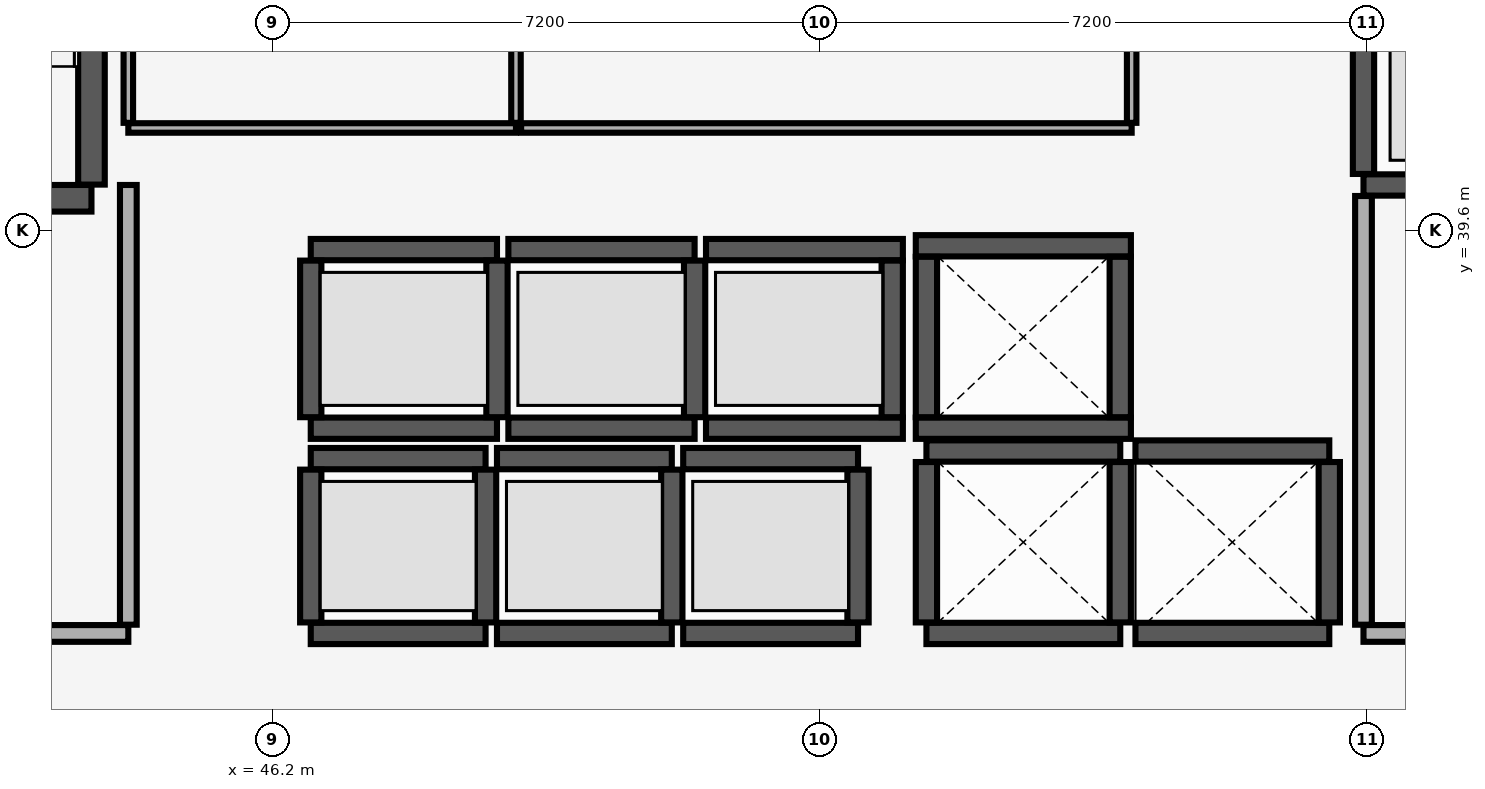
"""IFC4 building model, lengths in metres.
Left out: names, types, materials, properties, quantities, classifications, styles, units other than length and angle.
Written with IfcOpenShell. Run it as: python <this file> out.ifc"""

import sys

from ifc_helpers import new_model, si_unit, direction, frame, frame_2d, origin, place, context, subcontext, project, spatial, rectangle, extrude, element, fill, save


model = new_model("IFC4")
c1 = context("Model", 3, precision=1e-05, world=origin(), true_north=direction((0.0, 1.0)))
c2 = subcontext(c1, "Body", "Model", "MODEL_VIEW")
j1 = project(units=[si_unit("LENGTHUNIT", "METRE"), si_unit("PLANEANGLEUNIT", "RADIAN")], contexts=[c1])
p1 = place(None, origin())
s1 = spatial("IfcSite", under=j1, at=p1, CompositionType="ELEMENT")
p2 = place(p1, origin())
s2 = spatial("IfcBuilding", under=s1, at=p2, CompositionType="ELEMENT")
p3 = place(p2, frame((0.0, 0.0, 224.35)))
s3 = spatial("IfcBuildingStorey", under=s2, at=p3, CompositionType="ELEMENT", Elevation=224.35)
p4 = place(p3, frame((40.185, 40.025, 0.0), z_axis=(0.0, 0.0, 1.0), x_axis=(1.0, 0.0, 0.0)))
e1 = element("IfcWall", 1, at=p4, inside=s3, PredefinedType="SHEAR", context=c2, shape_type="SweptSolid", body=[
    extrude(rectangle(XDim=3.63, YDim=0.35, at=frame_2d((1.815, 0.0))), origin(), (0.0, 0.0, 1.0), 4.52),
])
p5 = place(p4, frame((1.24, 0.0, 0.0)))
e2 = element("IfcOpeningElement", 2, at=p5, cuts=e1, PredefinedType="OPENING", context=c2, shape_type="SweptSolid", body=[
    extrude(rectangle(XDim=1.15, YDim=2.15, at=frame_2d((0.575, 1.075))), frame((0.0, 0.185, 0.0), z_axis=(0.0, -1.0, 0.0), x_axis=(1.0, 0.0, 0.0)), (0.0, 0.0, 1.0), 0.37),
])
p6 = place(p3, frame((43.815, 40.205, 0.0), z_axis=(0.0, 0.0, 1.0), x_axis=(0.0, 1.0, 0.0)))
e3 = element("IfcWall", 3, at=p6, inside=s3, PredefinedType="SHEAR", context=c2, shape_type="SweptSolid", body=[
    extrude(rectangle(XDim=8.09, YDim=0.35, at=frame_2d((4.045, 0.0))), origin(), (0.0, 0.0, 1.0), 4.52),
])
p7 = place(p3, frame((46.7, 34.3, 0.0), z_axis=(0.0, 0.0, 1.0), x_axis=(1.0, 0.0, 0.0)))
e4 = element("IfcWall", 4, at=p7, inside=s3, PredefinedType="SHEAR", context=c2, shape_type="SweptSolid", body=[
    extrude(rectangle(XDim=2.3, YDim=0.28, at=frame_2d((1.15, 0.0))), origin(), (0.0, 0.0, 1.0), 4.52),
])
p8 = place(p7, frame((0.6, 0.0, 0.0)))
e5 = element("IfcOpeningElement", 5, at=p8, cuts=e4, PredefinedType="OPENING", context=c2, shape_type="SweptSolid", body=[
    extrude(rectangle(XDim=1.1, YDim=2.2, at=frame_2d((0.55, 1.1))), frame((0.0, 0.15, 0.0), z_axis=(0.0, -1.0, 0.0), x_axis=(1.0, 0.0, 0.0)), (0.0, 0.0, 1.0), 0.3),
])
p9 = place(p3, frame((46.7, 36.6, 0.0), z_axis=(0.0, 0.0, 1.0), x_axis=(1.0, 0.0, 0.0)))
e6 = element("IfcWall", 6, at=p9, inside=s3, PredefinedType="SHEAR", context=c2, shape_type="SweptSolid", body=[
    extrude(rectangle(XDim=2.3, YDim=0.28, at=frame_2d((1.15, 0.0))), origin(), (0.0, 0.0, 1.0), 4.52),
])
for number, where, z_axis, x_axis in (
    (7, (46.7, 34.445, 0.0), (0.0, 0.0, 1.0), (0.0, 1.0, 0.0)),
    (8, (49.0, 34.445, 0.0), (0.0, 0.0, 1.0), (0.0, 1.0, 0.0)),
):
    element("IfcWall", number, at=place(p3, frame(where, z_axis=z_axis, x_axis=x_axis)), inside=s3, PredefinedType="SHEAR", context=c2, shape_type="SweptSolid", body=[
        extrude(rectangle(XDim=2.01, YDim=0.28, at=frame_2d((1.005, 0.0))), origin(), (0.0, 0.0, 1.0), 4.52),
    ])
p10 = place(p3, frame((49.15, 34.3, 0.0), z_axis=(0.0, 0.0, 1.0), x_axis=(1.0, 0.0, 0.0)))
e9 = element("IfcWall", 9, at=p10, inside=s3, PredefinedType="SHEAR", context=c2, shape_type="SweptSolid", body=[
    extrude(rectangle(XDim=2.3, YDim=0.28, at=frame_2d((1.15, 0.0))), origin(), (0.0, 0.0, 1.0), 4.52),
])
p11 = place(p10, frame((0.6, 0.0, 0.0)))
e10 = element("IfcOpeningElement", 10, at=p11, cuts=e9, PredefinedType="OPENING", context=c2, shape_type="SweptSolid", body=[
    extrude(rectangle(XDim=1.1, YDim=2.2, at=frame_2d((0.55, 1.1))), frame((0.0, 0.15, 0.0), z_axis=(0.0, -1.0, 0.0), x_axis=(1.0, 0.0, 0.0)), (0.0, 0.0, 1.0), 0.3),
])
p12 = place(p3, frame((49.15, 36.6, 0.0), z_axis=(0.0, 0.0, 1.0), x_axis=(1.0, 0.0, 0.0)))
e11 = element("IfcWall", 11, at=p12, inside=s3, PredefinedType="SHEAR", context=c2, shape_type="SweptSolid", body=[
    extrude(rectangle(XDim=2.3, YDim=0.28, at=frame_2d((1.15, 0.0))), origin(), (0.0, 0.0, 1.0), 4.52),
])
p13 = place(p3, frame((51.45, 34.445, 0.0), z_axis=(0.0, 0.0, 1.0), x_axis=(0.0, 1.0, 0.0)))
e12 = element("IfcWall", 12, at=p13, inside=s3, PredefinedType="SHEAR", context=c2, shape_type="SweptSolid", body=[
    extrude(rectangle(XDim=2.01, YDim=0.28, at=frame_2d((1.005, 0.0))), origin(), (0.0, 0.0, 1.0), 4.52),
])
p14 = place(p3, frame((51.6, 34.3, 0.0), z_axis=(0.0, 0.0, 1.0), x_axis=(1.0, 0.0, 0.0)))
e13 = element("IfcWall", 13, at=p14, inside=s3, PredefinedType="SHEAR", context=c2, shape_type="SweptSolid", body=[
    extrude(rectangle(XDim=2.3, YDim=0.28, at=frame_2d((1.15, 0.0))), origin(), (0.0, 0.0, 1.0), 4.52),
])
p15 = place(p14, frame((0.6, 0.0, 0.0)))
e14 = element("IfcOpeningElement", 14, at=p15, cuts=e13, PredefinedType="OPENING", context=c2, shape_type="SweptSolid", body=[
    extrude(rectangle(XDim=1.1, YDim=2.2, at=frame_2d((0.55, 1.1))), frame((0.0, 0.15, 0.0), z_axis=(0.0, -1.0, 0.0), x_axis=(1.0, 0.0, 0.0)), (0.0, 0.0, 1.0), 0.3),
])
p16 = place(p3, frame((51.6, 36.6, 0.0), z_axis=(0.0, 0.0, 1.0), x_axis=(1.0, 0.0, 0.0)))
e15 = element("IfcWall", 15, at=p16, inside=s3, PredefinedType="SHEAR", context=c2, shape_type="SweptSolid", body=[
    extrude(rectangle(XDim=2.3, YDim=0.28, at=frame_2d((1.15, 0.0))), origin(), (0.0, 0.0, 1.0), 4.52),
])
p17 = place(p3, frame((53.9, 34.445, 0.0), z_axis=(0.0, 0.0, 1.0), x_axis=(0.0, 1.0, 0.0)))
e16 = element("IfcWall", 16, at=p17, inside=s3, PredefinedType="SHEAR", context=c2, shape_type="SweptSolid", body=[
    extrude(rectangle(XDim=2.01, YDim=0.28, at=frame_2d((1.005, 0.0))), origin(), (0.0, 0.0, 1.0), 4.52),
])
p18 = place(p3, frame((46.7, 37.0, 0.0), z_axis=(0.0, 0.0, 1.0), x_axis=(1.0, 0.0, 0.0)))
e17 = element("IfcWall", 17, at=p18, inside=s3, PredefinedType="SHEAR", context=c2, shape_type="SweptSolid", body=[
    extrude(rectangle(XDim=2.45, YDim=0.28, at=frame_2d((1.225, 0.0))), origin(), (0.0, 0.0, 1.0), 4.52),
])
p19 = place(p3, frame((46.7, 39.35, 0.0), z_axis=(0.0, 0.0, 1.0), x_axis=(1.0, 0.0, 0.0)))
e18 = element("IfcWall", 18, at=p19, inside=s3, PredefinedType="SHEAR", context=c2, shape_type="SweptSolid", body=[
    extrude(rectangle(XDim=2.45, YDim=0.28, at=frame_2d((1.225, 0.0))), origin(), (0.0, 0.0, 1.0), 4.52),
])
p20 = place(p19, frame((0.625, 0.0, 0.0)))
e19 = element("IfcOpeningElement", 19, at=p20, cuts=e18, PredefinedType="OPENING", context=c2, shape_type="SweptSolid", body=[
    extrude(rectangle(XDim=1.2, YDim=2.25, at=frame_2d((0.6, 1.125))), frame((0.0, 0.15, 0.0), z_axis=(0.0, -1.0, 0.0), x_axis=(1.0, 0.0, 0.0)), (0.0, 0.0, 1.0), 0.3),
])
for number, where, z_axis, x_axis in (
    (20, (46.7, 37.145, 0.0), (0.0, 0.0, 1.0), (0.0, 1.0, 0.0)),
    (21, (49.15, 37.145, 0.0), (0.0, 0.0, 1.0), (0.0, 1.0, 0.0)),
):
    element("IfcWall", number, at=place(p3, frame(where, z_axis=z_axis, x_axis=x_axis)), inside=s3, PredefinedType="SHEAR", context=c2, shape_type="SweptSolid", body=[
        extrude(rectangle(XDim=2.06, YDim=0.28, at=frame_2d((1.03, 0.0))), origin(), (0.0, 0.0, 1.0), 4.52),
    ])
p21 = place(p3, frame((49.3, 37.0, 0.0), z_axis=(0.0, 0.0, 1.0), x_axis=(1.0, 0.0, 0.0)))
e22 = element("IfcWall", 22, at=p21, inside=s3, PredefinedType="SHEAR", context=c2, shape_type="SweptSolid", body=[
    extrude(rectangle(XDim=2.45, YDim=0.28, at=frame_2d((1.225, 0.0))), origin(), (0.0, 0.0, 1.0), 4.52),
])
p22 = place(p3, frame((49.3, 39.35, 0.0), z_axis=(0.0, 0.0, 1.0), x_axis=(1.0, 0.0, 0.0)))
e23 = element("IfcWall", 23, at=p22, inside=s3, PredefinedType="SHEAR", context=c2, shape_type="SweptSolid", body=[
    extrude(rectangle(XDim=2.45, YDim=0.28, at=frame_2d((1.225, 0.0))), origin(), (0.0, 0.0, 1.0), 4.52),
])
p23 = place(p22, frame((0.625, 0.0, 0.0)))
e24 = element("IfcOpeningElement", 24, at=p23, cuts=e23, PredefinedType="OPENING", context=c2, shape_type="SweptSolid", body=[
    extrude(rectangle(XDim=1.2, YDim=2.25, at=frame_2d((0.6, 1.125))), frame((0.0, 0.15, 0.0), z_axis=(0.0, -1.0, 0.0), x_axis=(1.0, 0.0, 0.0)), (0.0, 0.0, 1.0), 0.3),
])
p24 = place(p3, frame((51.75, 37.145, 0.0), z_axis=(0.0, 0.0, 1.0), x_axis=(0.0, 1.0, 0.0)))
e25 = element("IfcWall", 25, at=p24, inside=s3, PredefinedType="SHEAR", context=c2, shape_type="SweptSolid", body=[
    extrude(rectangle(XDim=2.06, YDim=0.28, at=frame_2d((1.03, 0.0))), origin(), (0.0, 0.0, 1.0), 4.52),
])
p25 = place(p3, frame((51.9, 37.0, 0.0), z_axis=(0.0, 0.0, 1.0), x_axis=(1.0, 0.0, 0.0)))
e26 = element("IfcWall", 26, at=p25, inside=s3, PredefinedType="SHEAR", context=c2, shape_type="SweptSolid", body=[
    extrude(rectangle(XDim=2.59, YDim=0.28, at=frame_2d((1.295, 0.0))), origin(), (0.0, 0.0, 1.0), 4.52),
])
p26 = place(p3, frame((51.9, 39.35, 0.0), z_axis=(0.0, 0.0, 1.0), x_axis=(1.0, 0.0, 0.0)))
e27 = element("IfcWall", 27, at=p26, inside=s3, PredefinedType="SHEAR", context=c2, shape_type="SweptSolid", body=[
    extrude(rectangle(XDim=2.59, YDim=0.28, at=frame_2d((1.295, 0.0))), origin(), (0.0, 0.0, 1.0), 4.52),
])
p27 = place(p26, frame((0.625, 0.0, 0.0)))
e28 = element("IfcOpeningElement", 28, at=p27, cuts=e27, PredefinedType="OPENING", context=c2, shape_type="SweptSolid", body=[
    extrude(rectangle(XDim=1.2, YDim=2.25, at=frame_2d((0.6, 1.125))), frame((0.0, 0.15, 0.0), z_axis=(0.0, -1.0, 0.0), x_axis=(1.0, 0.0, 0.0)), (0.0, 0.0, 1.0), 0.3),
])
p28 = place(p3, frame((54.35, 37.145, 0.0), z_axis=(0.0, 0.0, 1.0), x_axis=(0.0, 1.0, 0.0)))
e29 = element("IfcWall", 29, at=p28, inside=s3, PredefinedType="SHEAR", context=c2, shape_type="SweptSolid", body=[
    extrude(rectangle(XDim=2.06, YDim=0.28, at=frame_2d((1.03, 0.0))), origin(), (0.0, 0.0, 1.0), 4.52),
])
for number, where, z_axis, x_axis in (
    (30, (54.8, 34.3, 0.0), (0.0, 0.0, 1.0), (1.0, 0.0, 0.0)),
    (31, (54.8, 36.7, 0.0), (0.0, 0.0, 1.0), (1.0, 0.0, 0.0)),
):
    element("IfcWall", number, at=place(p3, frame(where, z_axis=z_axis, x_axis=x_axis)), inside=s3, PredefinedType="SHEAR", context=c2, shape_type="SweptSolid", body=[
        extrude(rectangle(XDim=2.55, YDim=0.28, at=frame_2d((1.275, 0.0))), origin(), (0.0, 0.0, 1.0), 4.52),
    ])
for number, where, z_axis, x_axis in (
    (32, (54.8, 34.445, 0.0), (0.0, 0.0, 1.0), (0.0, 1.0, 0.0)),
    (33, (57.35, 34.445, 0.0), (0.0, 0.0, 1.0), (0.0, 1.0, 0.0)),
):
    element("IfcWall", number, at=place(p3, frame(where, z_axis=z_axis, x_axis=x_axis)), inside=s3, PredefinedType="SHEAR", context=c2, shape_type="SweptSolid", body=[
        extrude(rectangle(XDim=2.11, YDim=0.28, at=frame_2d((1.055, 0.0))), origin(), (0.0, 0.0, 1.0), 4.52),
    ])
for number, where, z_axis, x_axis in (
    (34, (57.55, 34.3, 0.0), (0.0, 0.0, 1.0), (1.0, 0.0, 0.0)),
    (35, (57.55, 36.7, 0.0), (0.0, 0.0, 1.0), (1.0, 0.0, 0.0)),
):
    element("IfcWall", number, at=place(p3, frame(where, z_axis=z_axis, x_axis=x_axis)), inside=s3, PredefinedType="SHEAR", context=c2, shape_type="SweptSolid", body=[
        extrude(rectangle(XDim=2.55, YDim=0.28, at=frame_2d((1.275, 0.0))), origin(), (0.0, 0.0, 1.0), 4.52),
    ])
p29 = place(p3, frame((60.1, 34.445, 0.0), z_axis=(0.0, 0.0, 1.0), x_axis=(0.0, 1.0, 0.0)))
e36 = element("IfcWall", 36, at=p29, inside=s3, PredefinedType="SHEAR", context=c2, shape_type="SweptSolid", body=[
    extrude(rectangle(XDim=2.11, YDim=0.28, at=frame_2d((1.055, 0.0))), origin(), (0.0, 0.0, 1.0), 4.52),
])
for number, where, z_axis, x_axis in (
    (37, (54.66, 37.0, 0.0), (0.0, 0.0, 1.0), (1.0, 0.0, 0.0)),
    (38, (54.66, 39.4, 0.0), (0.0, 0.0, 1.0), (1.0, 0.0, 0.0)),
):
    element("IfcWall", number, at=place(p3, frame(where, z_axis=z_axis, x_axis=x_axis)), inside=s3, PredefinedType="SHEAR", context=c2, shape_type="SweptSolid", body=[
        extrude(rectangle(XDim=2.83, YDim=0.28, at=frame_2d((1.415, 0.0))), origin(), (0.0, 0.0, 1.0), 4.52),
    ])
for number, where, z_axis, x_axis in (
    (39, (54.8, 37.145, 0.0), (0.0, 0.0, 1.0), (0.0, 1.0, 0.0)),
    (40, (57.35, 37.145, 0.0), (0.0, 0.0, 1.0), (0.0, 1.0, 0.0)),
):
    element("IfcWall", number, at=place(p3, frame(where, z_axis=z_axis, x_axis=x_axis)), inside=s3, PredefinedType="SHEAR", context=c2, shape_type="SweptSolid", body=[
        extrude(rectangle(XDim=2.11, YDim=0.28, at=frame_2d((1.055, 0.0))), origin(), (0.0, 0.0, 1.0), 4.52),
    ])
p30 = place(p3, frame((60.55, 40.2, 0.0), z_axis=(0.0, 0.0, 1.0), x_axis=(1.0, 0.0, 0.0)))
e41 = element("IfcWall", 41, at=p30, inside=s3, PredefinedType="SHEAR", context=c2, shape_type="SweptSolid", body=[
    extrude(rectangle(XDim=2.415, YDim=0.28, at=frame_2d((1.208, 0.0))), origin(), (0.0, 0.0, 1.0), 4.52),
])
p31 = place(p30, frame((0.575, 0.0, 0.0)))
e42 = element("IfcOpeningElement", 42, at=p31, cuts=e41, PredefinedType="OPENING", context=c2, shape_type="SweptSolid", body=[
    extrude(rectangle(XDim=1.3, YDim=2.3, at=frame_2d((0.65, 1.15))), frame((0.0, 0.15, 0.0), z_axis=(0.0, -1.0, 0.0), x_axis=(1.0, 0.0, 0.0)), (0.0, 0.0, 1.0), 0.3),
])
p32 = place(p3, frame((60.55, 40.345, 0.0), z_axis=(0.0, 0.0, 1.0), x_axis=(0.0, 1.0, 0.0)))
e43 = element("IfcWall", 43, at=p32, inside=s3, PredefinedType="SHEAR", context=c2, shape_type="SweptSolid", body=[
    extrude(rectangle(XDim=2.81, YDim=0.28, at=frame_2d((1.405, 0.0))), origin(), (0.0, 0.0, 1.0), 4.52),
])
p33 = place(p3, frame((60.55, 34.3, 0.0), z_axis=(0.0, 0.0, 1.0), x_axis=(1.0, 0.0, 0.0)))
e44 = element("IfcWall", 44, at=p33, inside=s3, PredefinedType="PARTITIONING", context=c2, shape_type="SweptSolid", body=[
    extrude(rectangle(XDim=6.05, YDim=0.22, at=frame_2d((3.025, 0.0))), origin(), (0.0, 0.0, 1.0), 4.52),
])
p34 = place(p33, frame((2.65, 0.0, 0.0)))
e45 = element("IfcOpeningElement", 45, at=p34, cuts=e44, PredefinedType="OPENING", context=c2, shape_type="SweptSolid", body=[
    extrude(rectangle(XDim=1.2, YDim=2.15, at=frame_2d((0.6, 1.075))), frame((0.0, 0.12, 0.0), z_axis=(0.0, -1.0, 0.0), x_axis=(1.0, 0.0, 0.0)), (0.0, 0.0, 1.0), 0.24),
])
p35 = place(p3, frame((60.55, 34.415, 0.0), z_axis=(0.0, 0.0, 1.0), x_axis=(0.0, 1.0, 0.0)))
e46 = element("IfcWall", 46, at=p35, inside=s3, PredefinedType="PARTITIONING", context=c2, shape_type="SweptSolid", body=[
    extrude(rectangle(XDim=5.64, YDim=0.22, at=frame_2d((2.82, 0.0))), origin(), (0.0, 0.0, 1.0), 4.52),
])
p36 = place(p3, frame((39.7, 34.3, 0.0), z_axis=(0.0, 0.0, 1.0), x_axis=(1.0, 0.0, 0.0)))
e47 = element("IfcWall", 47, at=p36, inside=s3, PredefinedType="PARTITIONING", context=c2, shape_type="SweptSolid", body=[
    extrude(rectangle(XDim=4.6, YDim=0.22, at=frame_2d((2.3, 0.0))), origin(), (0.0, 0.0, 1.0), 4.52),
])
p37 = place(p36, frame((1.7, 0.0, 0.0)))
e48 = element("IfcOpeningElement", 48, at=p37, cuts=e47, PredefinedType="OPENING", context=c2, shape_type="SweptSolid", body=[
    extrude(rectangle(XDim=1.2, YDim=2.15, at=frame_2d((0.6, 1.075))), frame((0.0, 0.12, 0.0), z_axis=(0.0, -1.0, 0.0), x_axis=(1.0, 0.0, 0.0)), (0.0, 0.0, 1.0), 0.24),
])
p38 = place(p3, frame((44.3, 34.415, 0.0), z_axis=(0.0, 0.0, 1.0), x_axis=(0.0, 1.0, 0.0)))
e49 = element("IfcWall", 49, at=p38, inside=s3, PredefinedType="PARTITIONING", context=c2, shape_type="SweptSolid", body=[
    extrude(rectangle(XDim=5.785, YDim=0.22, at=frame_2d((2.893, 0.0))), origin(), (0.0, 0.0, 1.0), 4.52),
])
p39 = place(p3, frame((44.3, 40.95, 0.0), z_axis=(0.0, 0.0, 1.0), x_axis=(1.0, 0.0, 0.0)))
e50 = element("IfcWall", 50, at=p39, inside=s3, PredefinedType="PARTITIONING", context=c2, shape_type="SweptSolid", body=[
    extrude(rectangle(XDim=5.1, YDim=0.125, at=frame_2d((2.55, 0.0))), origin(), (0.0, 0.0, 1.0), 4.52),
])
p40 = place(p39, frame((2.85, 0.0, 0.0)))
e51 = element("IfcOpeningElement", 51, at=p40, cuts=e50, PredefinedType="OPENING", context=c2, shape_type="SweptSolid", body=[
    extrude(rectangle(XDim=0.9, YDim=2.1, at=frame_2d((0.45, 1.05))), frame((0.0, 0.073, 0.0), z_axis=(0.0, -1.0, 0.0), x_axis=(1.0, 0.0, 0.0)), (0.0, 0.0, 1.0), 0.145),
])
for number, where, z_axis, x_axis in (
    (52, (44.3, 41.018, 0.0), (0.0, 0.0, 1.0), (0.0, 1.0, 0.0)),
    (53, (49.4, 41.018, 0.0), (0.0, 0.0, 1.0), (0.0, 1.0, 0.0)),
):
    element("IfcWall", number, at=place(p3, frame(where, z_axis=z_axis, x_axis=x_axis)), inside=s3, PredefinedType="PARTITIONING", context=c2, shape_type="SweptSolid", body=[
        extrude(rectangle(XDim=7.833, YDim=0.125, at=frame_2d((3.916, 0.0))), origin(), (0.0, 0.0, 1.0), 4.52),
    ])
p41 = place(p3, frame((49.468, 40.95, 0.0), z_axis=(0.0, 0.0, 1.0), x_axis=(1.0, 0.0, 0.0)))
e54 = element("IfcWall", 54, at=p41, inside=s3, PredefinedType="PARTITIONING", context=c2, shape_type="SweptSolid", body=[
    extrude(rectangle(XDim=8.032, YDim=0.125, at=frame_2d((4.016, 0.0))), origin(), (0.0, 0.0, 1.0), 4.52),
])
p42 = place(p41, frame((4.782, 0.0, 0.0)))
e55 = element("IfcOpeningElement", 55, at=p42, cuts=e54, PredefinedType="OPENING", context=c2, shape_type="SweptSolid", body=[
    extrude(rectangle(XDim=0.9, YDim=2.1, at=frame_2d((0.45, 1.05))), frame((0.0, 0.073, 0.0), z_axis=(0.0, -1.0, 0.0), x_axis=(1.0, 0.0, 0.0)), (0.0, 0.0, 1.0), 0.145),
])
p43 = place(p3, frame((57.5, 41.018, 0.0), z_axis=(0.0, 0.0, 1.0), x_axis=(0.0, 1.0, 0.0)))
e56 = element("IfcWall", 56, at=p43, inside=s3, PredefinedType="PARTITIONING", context=c2, shape_type="SweptSolid", body=[
    extrude(rectangle(XDim=2.167, YDim=0.125, at=frame_2d((1.084, 0.0))), origin(), (0.0, 0.0, 1.0), 4.52),
])
p44 = place(p8, origin())
e57 = element("IfcDoor", 57, at=p44, inside=s3, OperationType="DOUBLE_DOOR_SLIDING", PredefinedType="DOOR", context=c2, shape_type="SweptSolid", body=[
    extrude(rectangle(XDim=1.1, YDim=2.2, at=frame_2d((0.55, 1.1))), frame((0.0, 0.025, 0.0), z_axis=(0.0, -1.0, 0.0), x_axis=(1.0, 0.0, 0.0)), (0.0, 0.0, 1.0), 0.05),
])
fill(e5, e57)
p45 = place(p11, origin())
e58 = element("IfcDoor", 58, at=p45, inside=s3, OperationType="DOUBLE_DOOR_SLIDING", PredefinedType="DOOR", context=c2, shape_type="SweptSolid", body=[
    extrude(rectangle(XDim=1.1, YDim=2.2, at=frame_2d((0.55, 1.1))), frame((0.0, 0.025, 0.0), z_axis=(0.0, -1.0, 0.0), x_axis=(1.0, 0.0, 0.0)), (0.0, 0.0, 1.0), 0.05),
])
fill(e10, e58)
p46 = place(p15, origin())
e59 = element("IfcDoor", 59, at=p46, inside=s3, OperationType="DOUBLE_DOOR_SLIDING", PredefinedType="DOOR", context=c2, shape_type="SweptSolid", body=[
    extrude(rectangle(XDim=1.1, YDim=2.2, at=frame_2d((0.55, 1.1))), frame((0.0, 0.025, 0.0), z_axis=(0.0, -1.0, 0.0), x_axis=(1.0, 0.0, 0.0)), (0.0, 0.0, 1.0), 0.05),
])
fill(e14, e59)
p47 = place(p20, origin())
e60 = element("IfcDoor", 60, at=p47, inside=s3, OperationType="DOUBLE_DOOR_SLIDING", PredefinedType="DOOR", context=c2, shape_type="SweptSolid", body=[
    extrude(rectangle(XDim=1.2, YDim=2.25, at=frame_2d((0.6, 1.125))), frame((0.0, 0.025, 0.0), z_axis=(0.0, -1.0, 0.0), x_axis=(1.0, 0.0, 0.0)), (0.0, 0.0, 1.0), 0.05),
])
fill(e19, e60)
p48 = place(p23, origin())
e61 = element("IfcDoor", 61, at=p48, inside=s3, OperationType="DOUBLE_DOOR_SLIDING", PredefinedType="DOOR", context=c2, shape_type="SweptSolid", body=[
    extrude(rectangle(XDim=1.2, YDim=2.25, at=frame_2d((0.6, 1.125))), frame((0.0, 0.025, 0.0), z_axis=(0.0, -1.0, 0.0), x_axis=(1.0, 0.0, 0.0)), (0.0, 0.0, 1.0), 0.05),
])
fill(e24, e61)
p49 = place(p27, origin())
e62 = element("IfcDoor", 62, at=p49, inside=s3, OperationType="DOUBLE_DOOR_SLIDING", PredefinedType="DOOR", context=c2, shape_type="SweptSolid", body=[
    extrude(rectangle(XDim=1.2, YDim=2.25, at=frame_2d((0.6, 1.125))), frame((0.0, 0.025, 0.0), z_axis=(0.0, -1.0, 0.0), x_axis=(1.0, 0.0, 0.0)), (0.0, 0.0, 1.0), 0.05),
])
fill(e28, e62)
p50 = place(p40, origin())
e63 = element("IfcDoor", 63, at=p50, inside=s3, OperationType="SINGLE_SWING_LEFT", PredefinedType="DOOR", context=c2, shape_type="SweptSolid", body=[
    extrude(rectangle(XDim=0.9, YDim=2.1, at=frame_2d((0.45, 1.05))), frame((0.0, 0.025, 0.0), z_axis=(0.0, -1.0, 0.0), x_axis=(1.0, 0.0, 0.0)), (0.0, 0.0, 1.0), 0.05),
])
fill(e51, e63)
p51 = place(p42, origin())
e64 = element("IfcDoor", 64, at=p51, inside=s3, OperationType="SINGLE_SWING_RIGHT", PredefinedType="DOOR", context=c2, shape_type="SweptSolid", body=[
    extrude(rectangle(XDim=0.9, YDim=2.1, at=frame_2d((0.45, 1.05))), frame((0.0, 0.025, 0.0), z_axis=(0.0, -1.0, 0.0), x_axis=(1.0, 0.0, 0.0)), (0.0, 0.0, 1.0), 0.05),
])
fill(e55, e64)
save(model, sys.argv[1])
